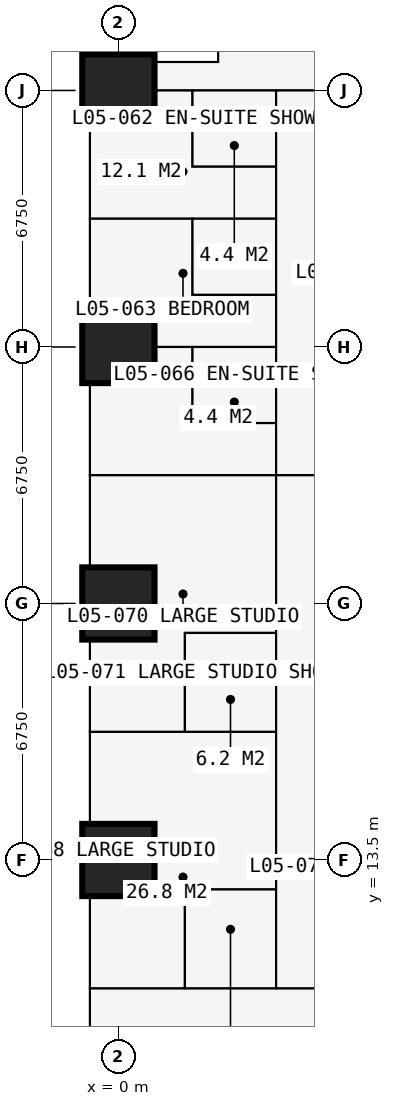
"""IFC4 building model, lengths in metres.
Left out: names, types, materials, properties, quantities, classifications, styles, units other than length and angle.
Written with IfcOpenShell. Run it as: python <this file> out.ifc"""

import sys

from ifc_helpers import new_model, si_unit, direction, frame, frame_2d, origin, origin_2d, place, context, subcontext, project, spatial, rectangle, extrude, element, fill, save


model = new_model("IFC4")
c1 = context("Model", 3, precision=1e-05, world=origin(), true_north=direction((0.0, 1.0)))
c2 = subcontext(c1, "Body", "Model", "MODEL_VIEW")
j1 = project(units=[si_unit("LENGTHUNIT", "METRE"), si_unit("PLANEANGLEUNIT", "RADIAN")], contexts=[c1])
p1 = place(None, origin())
s1 = spatial("IfcSite", under=j1, at=p1, CompositionType="ELEMENT")
p2 = place(p1, origin())
s2 = spatial("IfcBuilding", under=s1, at=p2, CompositionType="ELEMENT")
p3 = place(p2, frame((0.0, 0.0, 21.6)))
s3 = spatial("IfcBuildingStorey", under=s2, at=p3, CompositionType="ELEMENT", Elevation=21.6)
for number, where, z_axis, x_axis in (
    (1, (0.0, 13.5, 0.0), (0.0, 0.0, 1.0), (1.0, 0.0, 0.0)),
    (2, (0.0, 20.25, 0.0), (0.0, 0.0, 1.0), (1.0, 0.0, 0.0)),
    (3, (0.0, 27.0, 0.0), (0.0, 0.0, 1.0), (1.0, 0.0, 0.0)),
    (4, (0.0, 33.75, 0.0), (0.0, 0.0, 1.0), (1.0, 0.0, 0.0)),
):
    element("IfcColumn", number, at=place(p3, frame(where, z_axis=z_axis, x_axis=x_axis)), inside=s3, PredefinedType="COLUMN", context=c2, shape_type="SweptSolid", body=[
        extrude(rectangle(XDim=1.9, YDim=1.9, at=origin_2d()), origin(), (0.0, 0.0, 1.0), 3.6),
    ])
p4 = place(p3, frame((2.625, 37.875, 0.0), z_axis=(0.0, 0.0, 1.0), x_axis=(0.0, -1.0, 0.0)))
e5 = element("IfcWall", 5, at=p4, inside=s3, PredefinedType="SOLIDWALL", context=c2, shape_type="SweptSolid", body=[
    extrude(rectangle(XDim=3.375, YDim=0.3, at=frame_2d((1.688, 0.0))), origin(), (0.0, 0.0, 1.0), 3.375),
])
p5 = place(p4, frame((0.788, 0.0, 0.6)))
e6 = element("IfcOpeningElement", 6, at=p5, cuts=e5, PredefinedType="OPENING", context=c2, shape_type="SweptSolid", body=[
    extrude(rectangle(XDim=1.8, YDim=2.1, at=frame_2d((0.9, 1.05))), frame((0.0, 0.16, 0.0), z_axis=(0.0, -1.0, 0.0), x_axis=(1.0, 0.0, 0.0)), (0.0, 0.0, 1.0), 0.32),
])
p6 = place(p3, frame((2.625, 34.5, 0.0), z_axis=(0.0, 0.0, 1.0), x_axis=(-1.0, 0.0, 0.0)))
e7 = element("IfcWall", 7, at=p6, inside=s3, PredefinedType="SOLIDWALL", context=c2, shape_type="SweptSolid", body=[
    extrude(rectangle(XDim=3.375, YDim=0.3, at=frame_2d((1.688, 0.0))), origin(), (0.0, 0.0, 1.0), 3.375),
])
p7 = place(p6, frame((0.317, 0.0, 0.9)))
e8 = element("IfcOpeningElement", 8, at=p7, cuts=e7, PredefinedType="OPENING", context=c2, shape_type="SweptSolid", body=[
    extrude(rectangle(XDim=1.2, YDim=1.8, at=frame_2d((0.6, 0.9))), frame((0.0, 0.16, 0.0), z_axis=(0.0, -1.0, 0.0), x_axis=(1.0, 0.0, 0.0)), (0.0, 0.0, 1.0), 0.32),
])
p8 = place(p3, frame((-0.75, 20.25, 0.0), z_axis=(0.0, 0.0, 1.0), x_axis=(0.0, 1.0, 0.0)))
e9 = element("IfcWall", 9, at=p8, inside=s3, PredefinedType="SOLIDWALL", context=c2, shape_type="SweptSolid", body=[
    extrude(rectangle(XDim=6.75, YDim=0.15, at=frame_2d((3.375, 0.0))), origin(), (0.0, 0.0, 1.0), 3.375),
])
p9 = place(p8, frame((0.996, 0.0, 0.0)))
e10 = element("IfcOpeningElement", 10, at=p9, cuts=e9, PredefinedType="OPENING", context=c2, shape_type="SweptSolid", body=[
    extrude(rectangle(XDim=1.0, YDim=2.2, at=frame_2d((0.5, 1.1))), frame((0.0, 0.085, 0.0), z_axis=(0.0, -1.0, 0.0), x_axis=(1.0, 0.0, 0.0)), (0.0, 0.0, 1.0), 0.17),
])
p10 = place(p8, frame((2.042, 0.0, 0.9)))
e11 = element("IfcOpeningElement", 11, at=p10, cuts=e9, PredefinedType="OPENING", context=c2, shape_type="SweptSolid", body=[
    extrude(rectangle(XDim=1.2, YDim=1.8, at=frame_2d((0.6, 0.9))), frame((0.0, 0.085, 0.0), z_axis=(0.0, -1.0, 0.0), x_axis=(1.0, 0.0, 0.0)), (0.0, 0.0, 1.0), 0.17),
])
p11 = place(p8, frame((4.754, 0.0, 0.0)))
e12 = element("IfcOpeningElement", 12, at=p11, cuts=e9, PredefinedType="OPENING", context=c2, shape_type="SweptSolid", body=[
    extrude(rectangle(XDim=1.0, YDim=2.2, at=frame_2d((0.5, 1.1))), frame((0.0, 0.085, 0.0), z_axis=(0.0, -1.0, 0.0), x_axis=(1.0, 0.0, 0.0)), (0.0, 0.0, 1.0), 0.17),
])
p12 = place(p8, frame((3.508, 0.0, 0.9)))
e13 = element("IfcOpeningElement", 13, at=p12, cuts=e9, PredefinedType="OPENING", context=c2, shape_type="SweptSolid", body=[
    extrude(rectangle(XDim=1.2, YDim=1.8, at=frame_2d((0.6, 0.9))), frame((0.0, 0.085, 0.0), z_axis=(0.0, -1.0, 0.0), x_axis=(1.0, 0.0, 0.0)), (0.0, 0.0, 1.0), 0.17),
])
p13 = place(p3, frame((-0.85, 23.625, 0.0), z_axis=(0.0, 0.0, 1.0), x_axis=(-1.0, 0.0, 0.0)))
e14 = element("IfcWall", 14, at=p13, inside=s3, PredefinedType="USERDEFINED", context=c2, shape_type="SweptSolid", body=[
    extrude(rectangle(XDim=2.2, YDim=1.0, at=frame_2d((1.1, 0.0))), origin(), (0.0, 0.0, 1.0), 0.9),
])
p14 = place(p3, frame((-0.734, 10.125, 0.0), z_axis=(0.0, 0.0, 1.0), x_axis=(1.0, 0.0, 0.0)))
e15 = element("IfcWall", 15, at=p14, inside=s3, PredefinedType="PARTITIONING", context=c2, shape_type="SweptSolid", body=[
    extrude(rectangle(XDim=10.859, YDim=0.15, at=frame_2d((5.429, 0.0))), origin(), (0.0, 0.0, 1.0), 3.375),
])
p15 = place(p14, frame((5.134, 0.0, 0.0)))
e16 = element("IfcOpeningElement", 16, at=p15, cuts=e15, PredefinedType="OPENING", context=c2, shape_type="SweptSolid", body=[
    extrude(rectangle(XDim=1.0, YDim=2.2, at=frame_2d((0.5, 1.1))), frame((0.0, 0.085, 0.0), z_axis=(0.0, -1.0, 0.0), x_axis=(1.0, 0.0, 0.0)), (0.0, 0.0, 1.0), 0.17),
])
p16 = place(p3, frame((-0.734, 16.875, 0.0), z_axis=(0.0, 0.0, 1.0), x_axis=(1.0, 0.0, 0.0)))
e17 = element("IfcWall", 17, at=p16, inside=s3, PredefinedType="PARTITIONING", context=c2, shape_type="SweptSolid", body=[
    extrude(rectangle(XDim=4.884, YDim=0.175, at=frame_2d((2.442, 0.0))), origin(), (0.0, 0.0, 1.0), 3.375),
])
p17 = place(p16, frame((3.234, 0.0, 0.0)))
e18 = element("IfcOpeningElement", 18, at=p17, cuts=e17, PredefinedType="OPENING", context=c2, shape_type="SweptSolid", body=[
    extrude(rectangle(XDim=0.9, YDim=2.2, at=frame_2d((0.45, 1.1))), frame((0.0, 0.097, 0.0), z_axis=(0.0, -1.0, 0.0), x_axis=(1.0, 0.0, 0.0)), (0.0, 0.0, 1.0), 0.195),
])
p18 = place(p3, frame((-0.734, 23.625, 0.0), z_axis=(0.0, 0.0, 1.0), x_axis=(1.0, 0.0, 0.0)))
e19 = element("IfcWall", 19, at=p18, inside=s3, PredefinedType="PARTITIONING", context=c2, shape_type="SweptSolid", body=[
    extrude(rectangle(XDim=12.034, YDim=0.15, at=frame_2d((6.017, 0.0))), origin(), (0.0, 0.0, 1.0), 3.375),
])
p19 = place(p3, frame((-0.734, 27.0, 0.0), z_axis=(0.0, 0.0, 1.0), x_axis=(1.0, 0.0, 0.0)))
e20 = element("IfcWall", 20, at=p19, inside=s3, PredefinedType="PARTITIONING", context=c2, shape_type="SweptSolid", body=[
    extrude(rectangle(XDim=4.884, YDim=0.175, at=frame_2d((2.442, 0.0))), origin(), (0.0, 0.0, 1.0), 2.877),
])
p20 = place(p19, frame((3.334, 0.0, 0.0)))
e21 = element("IfcOpeningElement", 21, at=p20, cuts=e20, PredefinedType="OPENING", context=c2, shape_type="SweptSolid", body=[
    extrude(rectangle(XDim=0.9, YDim=2.2, at=frame_2d((0.45, 1.1))), frame((0.0, 0.097, 0.0), z_axis=(0.0, -1.0, 0.0), x_axis=(1.0, 0.0, 0.0)), (0.0, 0.0, 1.0), 0.195),
])
p21 = place(p3, frame((-0.734, 30.375, 0.0), z_axis=(0.0, 0.0, 1.0), x_axis=(1.0, 0.0, 0.0)))
e22 = element("IfcWall", 22, at=p21, inside=s3, PredefinedType="PARTITIONING", context=c2, shape_type="SweptSolid", body=[
    extrude(rectangle(XDim=4.884, YDim=0.175, at=frame_2d((2.442, 0.0))), origin(), (0.0, 0.0, 1.0), 3.375),
])
p22 = place(p21, frame((3.334, 0.0, 0.0)))
e23 = element("IfcOpeningElement", 23, at=p22, cuts=e22, PredefinedType="OPENING", context=c2, shape_type="SweptSolid", body=[
    extrude(rectangle(XDim=0.9, YDim=2.2, at=frame_2d((0.45, 1.1))), frame((0.0, 0.097, 0.0), z_axis=(0.0, -1.0, 0.0), x_axis=(1.0, 0.0, 0.0)), (0.0, 0.0, 1.0), 0.195),
])
p23 = place(p3, frame((-0.734, 33.75, 0.0), z_axis=(0.0, 0.0, 1.0), x_axis=(1.0, 0.0, 0.0)))
e24 = element("IfcWall", 24, at=p23, inside=s3, PredefinedType="PARTITIONING", context=c2, shape_type="SweptSolid", body=[
    extrude(rectangle(XDim=10.859, YDim=0.15, at=frame_2d((5.429, 0.0))), origin(), (0.0, 0.0, 1.0), 2.877),
])
p24 = place(p23, frame((8.434, 0.0, 0.0)))
e25 = element("IfcOpeningElement", 25, at=p24, cuts=e24, PredefinedType="OPENING", context=c2, shape_type="SweptSolid", body=[
    extrude(rectangle(XDim=1.0, YDim=2.2, at=frame_2d((0.5, 1.1))), frame((0.0, 0.085, 0.0), z_axis=(0.0, -1.0, 0.0), x_axis=(1.0, 0.0, 0.0)), (0.0, 0.0, 1.0), 0.17),
])
p25 = place(p3, frame((1.75, 10.125, 0.0), z_axis=(0.0, 0.0, 1.0), x_axis=(0.0, 1.0, 0.0)))
e26 = element("IfcWall", 26, at=p25, inside=s3, PredefinedType="PARTITIONING", context=c2, shape_type="SweptSolid", body=[
    extrude(rectangle(XDim=2.6, YDim=0.1, at=frame_2d((1.3, 0.0))), origin(), (0.0, 0.0, 1.0), 3.375),
])
p26 = place(p25, frame((0.85, 0.0, 0.0)))
e27 = element("IfcOpeningElement", 27, at=p26, cuts=e26, PredefinedType="OPENING", context=c2, shape_type="SweptSolid", body=[
    extrude(rectangle(XDim=0.9, YDim=2.2, at=frame_2d((0.45, 1.1))), frame((0.0, 0.06, 0.0), z_axis=(0.0, -1.0, 0.0), x_axis=(1.0, 0.0, 0.0)), (0.0, 0.0, 1.0), 0.12),
])
p27 = place(p3, frame((1.75, 12.725, 0.0), z_axis=(0.0, 0.0, 1.0), x_axis=(1.0, 0.0, 0.0)))
e28 = element("IfcWall", 28, at=p27, inside=s3, PredefinedType="PARTITIONING", context=c2, shape_type="SweptSolid", body=[
    extrude(rectangle(XDim=2.4, YDim=0.1, at=frame_2d((1.2, 0.0))), origin(), (0.0, 0.0, 1.0), 3.375),
])
p28 = place(p3, frame((1.75, 16.875, 0.0), z_axis=(0.0, 0.0, 1.0), x_axis=(0.0, 1.0, 0.0)))
e29 = element("IfcWall", 29, at=p28, inside=s3, PredefinedType="PARTITIONING", context=c2, shape_type="SweptSolid", body=[
    extrude(rectangle(XDim=2.6, YDim=0.1, at=frame_2d((1.3, 0.0))), origin(), (0.0, 0.0, 1.0), 3.375),
])
p29 = place(p3, frame((1.75, 19.475, 0.0), z_axis=(0.0, 0.0, 1.0), x_axis=(1.0, 0.0, 0.0)))
e30 = element("IfcWall", 30, at=p29, inside=s3, PredefinedType="PARTITIONING", context=c2, shape_type="SweptSolid", body=[
    extrude(rectangle(XDim=2.4, YDim=0.1, at=frame_2d((1.2, 0.0))), origin(), (0.0, 0.0, 1.0), 3.375),
])
p30 = place(p3, frame((1.95, 25.0, 0.0), z_axis=(0.0, 0.0, 1.0), x_axis=(0.0, 1.0, 0.0)))
e31 = element("IfcWall", 31, at=p30, inside=s3, PredefinedType="PARTITIONING", context=c2, shape_type="SweptSolid", body=[
    extrude(rectangle(XDim=2.0, YDim=0.1, at=frame_2d((1.0, 0.0))), origin(), (0.0, 0.0, 1.0), 3.375),
])
p31 = place(p3, frame((1.95, 25.0, 0.0), z_axis=(0.0, 0.0, 1.0), x_axis=(1.0, 0.0, 0.0)))
e32 = element("IfcWall", 32, at=p31, inside=s3, PredefinedType="PARTITIONING", context=c2, shape_type="SweptSolid", body=[
    extrude(rectangle(XDim=2.2, YDim=0.1, at=frame_2d((1.1, 0.0))), origin(), (0.0, 0.0, 1.0), 3.375),
])
p32 = place(p3, frame((1.95, 28.375, 0.0), z_axis=(0.0, 0.0, 1.0), x_axis=(0.0, 1.0, 0.0)))
e33 = element("IfcWall", 33, at=p32, inside=s3, PredefinedType="PARTITIONING", context=c2, shape_type="SweptSolid", body=[
    extrude(rectangle(XDim=2.0, YDim=0.1, at=frame_2d((1.0, 0.0))), origin(), (0.0, 0.0, 1.0), 3.375),
])
p33 = place(p3, frame((1.95, 28.375, 0.0), z_axis=(0.0, 0.0, 1.0), x_axis=(1.0, 0.0, 0.0)))
e34 = element("IfcWall", 34, at=p33, inside=s3, PredefinedType="PARTITIONING", context=c2, shape_type="SweptSolid", body=[
    extrude(rectangle(XDim=2.2, YDim=0.1, at=frame_2d((1.1, 0.0))), origin(), (0.0, 0.0, 1.0), 3.375),
])
p34 = place(p3, frame((1.95, 31.75, 0.0), z_axis=(0.0, 0.0, 1.0), x_axis=(0.0, 1.0, 0.0)))
e35 = element("IfcWall", 35, at=p34, inside=s3, PredefinedType="PARTITIONING", context=c2, shape_type="SweptSolid", body=[
    extrude(rectangle(XDim=2.0, YDim=0.1, at=frame_2d((1.0, 0.0))), origin(), (0.0, 0.0, 1.0), 3.375),
])
p35 = place(p3, frame((1.95, 31.75, 0.0), z_axis=(0.0, 0.0, 1.0), x_axis=(1.0, 0.0, 0.0)))
e36 = element("IfcWall", 36, at=p35, inside=s3, PredefinedType="PARTITIONING", context=c2, shape_type="SweptSolid", body=[
    extrude(rectangle(XDim=2.2, YDim=0.1, at=frame_2d((1.1, 0.0))), origin(), (0.0, 0.0, 1.0), 3.375),
])
p36 = place(p35, frame((0.65, 0.0, 0.0)))
e37 = element("IfcOpeningElement", 37, at=p36, cuts=e36, PredefinedType="OPENING", context=c2, shape_type="SweptSolid", body=[
    extrude(rectangle(XDim=0.9, YDim=2.2, at=frame_2d((0.45, 1.1))), frame((0.0, 0.06, 0.0), z_axis=(0.0, -1.0, 0.0), x_axis=(1.0, 0.0, 0.0)), (0.0, 0.0, 1.0), 0.12),
])
p37 = place(p3, frame((4.15, 10.125, 0.0), z_axis=(0.0, 0.0, 1.0), x_axis=(0.0, 1.0, 0.0)))
e38 = element("IfcWall", 38, at=p37, inside=s3, PredefinedType="PARTITIONING", context=c2, shape_type="SweptSolid", body=[
    extrude(rectangle(XDim=23.625, YDim=0.15, at=frame_2d((11.812, 0.0))), origin(), (0.0, 0.0, 1.0), 3.375),
])
p38 = place(p37, frame((20.5, 0.0, 0.0)))
e39 = element("IfcOpeningElement", 39, at=p38, cuts=e38, PredefinedType="OPENING", context=c2, shape_type="SweptSolid", body=[
    extrude(rectangle(XDim=0.95, YDim=2.2, at=frame_2d((0.475, 1.1))), frame((0.0, 0.085, 0.0), z_axis=(0.0, -1.0, 0.0), x_axis=(1.0, 0.0, 0.0)), (0.0, 0.0, 1.0), 0.17),
])
p39 = place(p37, frame((17.125, 0.0, 0.0)))
e40 = element("IfcOpeningElement", 40, at=p39, cuts=e38, PredefinedType="OPENING", context=c2, shape_type="SweptSolid", body=[
    extrude(rectangle(XDim=0.95, YDim=2.2, at=frame_2d((0.475, 1.1))), frame((0.0, 0.085, 0.0), z_axis=(0.0, -1.0, 0.0), x_axis=(1.0, 0.0, 0.0)), (0.0, 0.0, 1.0), 0.17),
])
p40 = place(p37, frame((13.7, 0.0, 0.0)))
e41 = element("IfcOpeningElement", 41, at=p40, cuts=e38, PredefinedType="OPENING", context=c2, shape_type="SweptSolid", body=[
    extrude(rectangle(XDim=0.95, YDim=2.2, at=frame_2d((0.475, 1.1))), frame((0.0, 0.085, 0.0), z_axis=(0.0, -1.0, 0.0), x_axis=(1.0, 0.0, 0.0)), (0.0, 0.0, 1.0), 0.17),
])
p41 = place(p37, frame((4.2, 0.0, 0.0)))
e42 = element("IfcOpeningElement", 42, at=p41, cuts=e38, PredefinedType="OPENING", context=c2, shape_type="SweptSolid", body=[
    extrude(rectangle(XDim=0.95, YDim=2.2, at=frame_2d((0.475, 1.1))), frame((0.0, 0.085, 0.0), z_axis=(0.0, -1.0, 0.0), x_axis=(1.0, 0.0, 0.0)), (0.0, 0.0, 1.0), 0.17),
])
p42 = place(p37, frame((10.95, 0.0, 0.0)))
e43 = element("IfcOpeningElement", 43, at=p42, cuts=e38, PredefinedType="OPENING", context=c2, shape_type="SweptSolid", body=[
    extrude(rectangle(XDim=0.95, YDim=2.2, at=frame_2d((0.475, 1.1))), frame((0.0, 0.085, 0.0), z_axis=(0.0, -1.0, 0.0), x_axis=(1.0, 0.0, 0.0)), (0.0, 0.0, 1.0), 0.17),
])
p43 = place(p7, origin())
e44 = element("IfcWindow", 44, at=p43, inside=s3, PartitioningType="SINGLE_PANEL", PredefinedType="WINDOW", context=c2, shape_type="SweptSolid", body=[
    extrude(rectangle(XDim=1.2, YDim=1.8, at=frame_2d((0.6, 0.9))), frame((0.0, 0.03, 0.0), z_axis=(0.0, -1.0, 0.0), x_axis=(1.0, 0.0, 0.0)), (0.0, 0.0, 1.0), 0.06),
])
fill(e8, e44)
p44 = place(p9, origin())
e45 = element("IfcDoor", 45, at=p44, inside=s3, OperationType="SINGLE_SWING_LEFT", PredefinedType="DOOR", context=c2, shape_type="SweptSolid", body=[
    extrude(rectangle(XDim=1.0, YDim=2.2, at=frame_2d((0.5, 1.1))), frame((0.0, 0.025, 0.0), z_axis=(0.0, -1.0, 0.0), x_axis=(1.0, 0.0, 0.0)), (0.0, 0.0, 1.0), 0.05),
])
fill(e10, e45)
p45 = place(p10, origin())
e46 = element("IfcWindow", 46, at=p45, inside=s3, PartitioningType="SINGLE_PANEL", PredefinedType="WINDOW", context=c2, shape_type="SweptSolid", body=[
    extrude(rectangle(XDim=1.2, YDim=1.8, at=frame_2d((0.6, 0.9))), frame((0.0, 0.03, 0.0), z_axis=(0.0, -1.0, 0.0), x_axis=(1.0, 0.0, 0.0)), (0.0, 0.0, 1.0), 0.06),
])
fill(e11, e46)
p46 = place(p11, origin())
e47 = element("IfcDoor", 47, at=p46, inside=s3, OperationType="SINGLE_SWING_RIGHT", PredefinedType="DOOR", context=c2, shape_type="SweptSolid", body=[
    extrude(rectangle(XDim=1.0, YDim=2.2, at=frame_2d((0.5, 1.1))), frame((0.0, 0.025, 0.0), z_axis=(0.0, -1.0, 0.0), x_axis=(1.0, 0.0, 0.0)), (0.0, 0.0, 1.0), 0.05),
])
fill(e12, e47)
p47 = place(p12, origin())
e48 = element("IfcWindow", 48, at=p47, inside=s3, PartitioningType="SINGLE_PANEL", PredefinedType="WINDOW", context=c2, shape_type="SweptSolid", body=[
    extrude(rectangle(XDim=1.2, YDim=1.8, at=frame_2d((0.6, 0.9))), frame((0.0, 0.03, 0.0), z_axis=(0.0, -1.0, 0.0), x_axis=(1.0, 0.0, 0.0)), (0.0, 0.0, 1.0), 0.06),
])
fill(e13, e48)
p48 = place(p15, origin())
e49 = element("IfcDoor", 49, at=p48, inside=s3, OperationType="SINGLE_SWING_LEFT", PredefinedType="DOOR", context=c2, shape_type="SweptSolid", body=[
    extrude(rectangle(XDim=1.0, YDim=2.2, at=frame_2d((0.5, 1.1))), frame((0.0, 0.025, 0.0), z_axis=(0.0, -1.0, 0.0), x_axis=(1.0, 0.0, 0.0)), (0.0, 0.0, 1.0), 0.05),
])
fill(e16, e49)
p49 = place(p38, origin())
e50 = element("IfcDoor", 50, at=p49, inside=s3, OperationType="SINGLE_SWING_LEFT", PredefinedType="DOOR", context=c2, shape_type="SweptSolid", body=[
    extrude(rectangle(XDim=0.95, YDim=2.2, at=frame_2d((0.475, 1.1))), frame((0.0, 0.025, 0.0), z_axis=(0.0, -1.0, 0.0), x_axis=(1.0, 0.0, 0.0)), (0.0, 0.0, 1.0), 0.05),
])
fill(e39, e50)
p50 = place(p36, origin())
e51 = element("IfcDoor", 51, at=p50, inside=s3, OperationType="SINGLE_SWING_RIGHT", PredefinedType="DOOR", context=c2, shape_type="SweptSolid", body=[
    extrude(rectangle(XDim=0.9, YDim=2.2, at=frame_2d((0.45, 1.1))), frame((0.0, 0.025, 0.0), z_axis=(0.0, -1.0, 0.0), x_axis=(1.0, 0.0, 0.0)), (0.0, 0.0, 1.0), 0.05),
])
fill(e37, e51)
p51 = place(p39, origin())
e52 = element("IfcDoor", 52, at=p51, inside=s3, OperationType="SINGLE_SWING_LEFT", PredefinedType="DOOR", context=c2, shape_type="SweptSolid", body=[
    extrude(rectangle(XDim=0.95, YDim=2.2, at=frame_2d((0.475, 1.1))), frame((0.0, 0.025, 0.0), z_axis=(0.0, -1.0, 0.0), x_axis=(1.0, 0.0, 0.0)), (0.0, 0.0, 1.0), 0.05),
])
fill(e40, e52)
p52 = place(p22, origin())
e53 = element("IfcDoor", 53, at=p52, inside=s3, OperationType="SINGLE_SWING_RIGHT", PredefinedType="DOOR", context=c2, shape_type="SweptSolid", body=[
    extrude(rectangle(XDim=0.9, YDim=2.2, at=frame_2d((0.45, 1.1))), frame((0.0, 0.025, 0.0), z_axis=(0.0, -1.0, 0.0), x_axis=(1.0, 0.0, 0.0)), (0.0, 0.0, 1.0), 0.05),
])
fill(e23, e53)
p53 = place(p40, origin())
e54 = element("IfcDoor", 54, at=p53, inside=s3, OperationType="SINGLE_SWING_LEFT", PredefinedType="DOOR", context=c2, shape_type="SweptSolid", body=[
    extrude(rectangle(XDim=0.95, YDim=2.2, at=frame_2d((0.475, 1.1))), frame((0.0, 0.025, 0.0), z_axis=(0.0, -1.0, 0.0), x_axis=(1.0, 0.0, 0.0)), (0.0, 0.0, 1.0), 0.05),
])
fill(e41, e54)
p54 = place(p20, origin())
e55 = element("IfcDoor", 55, at=p54, inside=s3, OperationType="SINGLE_SWING_RIGHT", PredefinedType="DOOR", context=c2, shape_type="SweptSolid", body=[
    extrude(rectangle(XDim=0.9, YDim=2.2, at=frame_2d((0.45, 1.1))), frame((0.0, 0.025, 0.0), z_axis=(0.0, -1.0, 0.0), x_axis=(1.0, 0.0, 0.0)), (0.0, 0.0, 1.0), 0.05),
])
fill(e21, e55)
p55 = place(p41, origin())
e56 = element("IfcDoor", 56, at=p55, inside=s3, OperationType="SINGLE_SWING_LEFT", PredefinedType="DOOR", context=c2, shape_type="SweptSolid", body=[
    extrude(rectangle(XDim=0.95, YDim=2.2, at=frame_2d((0.475, 1.1))), frame((0.0, 0.025, 0.0), z_axis=(0.0, -1.0, 0.0), x_axis=(1.0, 0.0, 0.0)), (0.0, 0.0, 1.0), 0.05),
])
fill(e42, e56)
p56 = place(p26, origin())
e57 = element("IfcDoor", 57, at=p56, inside=s3, OperationType="SINGLE_SWING_RIGHT", PredefinedType="DOOR", context=c2, shape_type="SweptSolid", body=[
    extrude(rectangle(XDim=0.9, YDim=2.2, at=frame_2d((0.45, 1.1))), frame((0.0, 0.025, 0.0), z_axis=(0.0, -1.0, 0.0), x_axis=(1.0, 0.0, 0.0)), (0.0, 0.0, 1.0), 0.05),
])
fill(e27, e57)
p57 = place(p42, origin())
e58 = element("IfcDoor", 58, at=p57, inside=s3, OperationType="SINGLE_SWING_LEFT", PredefinedType="DOOR", context=c2, shape_type="SweptSolid", body=[
    extrude(rectangle(XDim=0.95, YDim=2.2, at=frame_2d((0.475, 1.1))), frame((0.0, 0.025, 0.0), z_axis=(0.0, -1.0, 0.0), x_axis=(1.0, 0.0, 0.0)), (0.0, 0.0, 1.0), 0.05),
])
fill(e43, e58)
p58 = place(p17, origin())
e59 = element("IfcDoor", 59, at=p58, inside=s3, OperationType="SINGLE_SWING_RIGHT", PredefinedType="DOOR", context=c2, shape_type="SweptSolid", body=[
    extrude(rectangle(XDim=0.9, YDim=2.2, at=frame_2d((0.45, 1.1))), frame((0.0, 0.025, 0.0), z_axis=(0.0, -1.0, 0.0), x_axis=(1.0, 0.0, 0.0)), (0.0, 0.0, 1.0), 0.05),
])
fill(e18, e59)
save(model, sys.argv[1])
